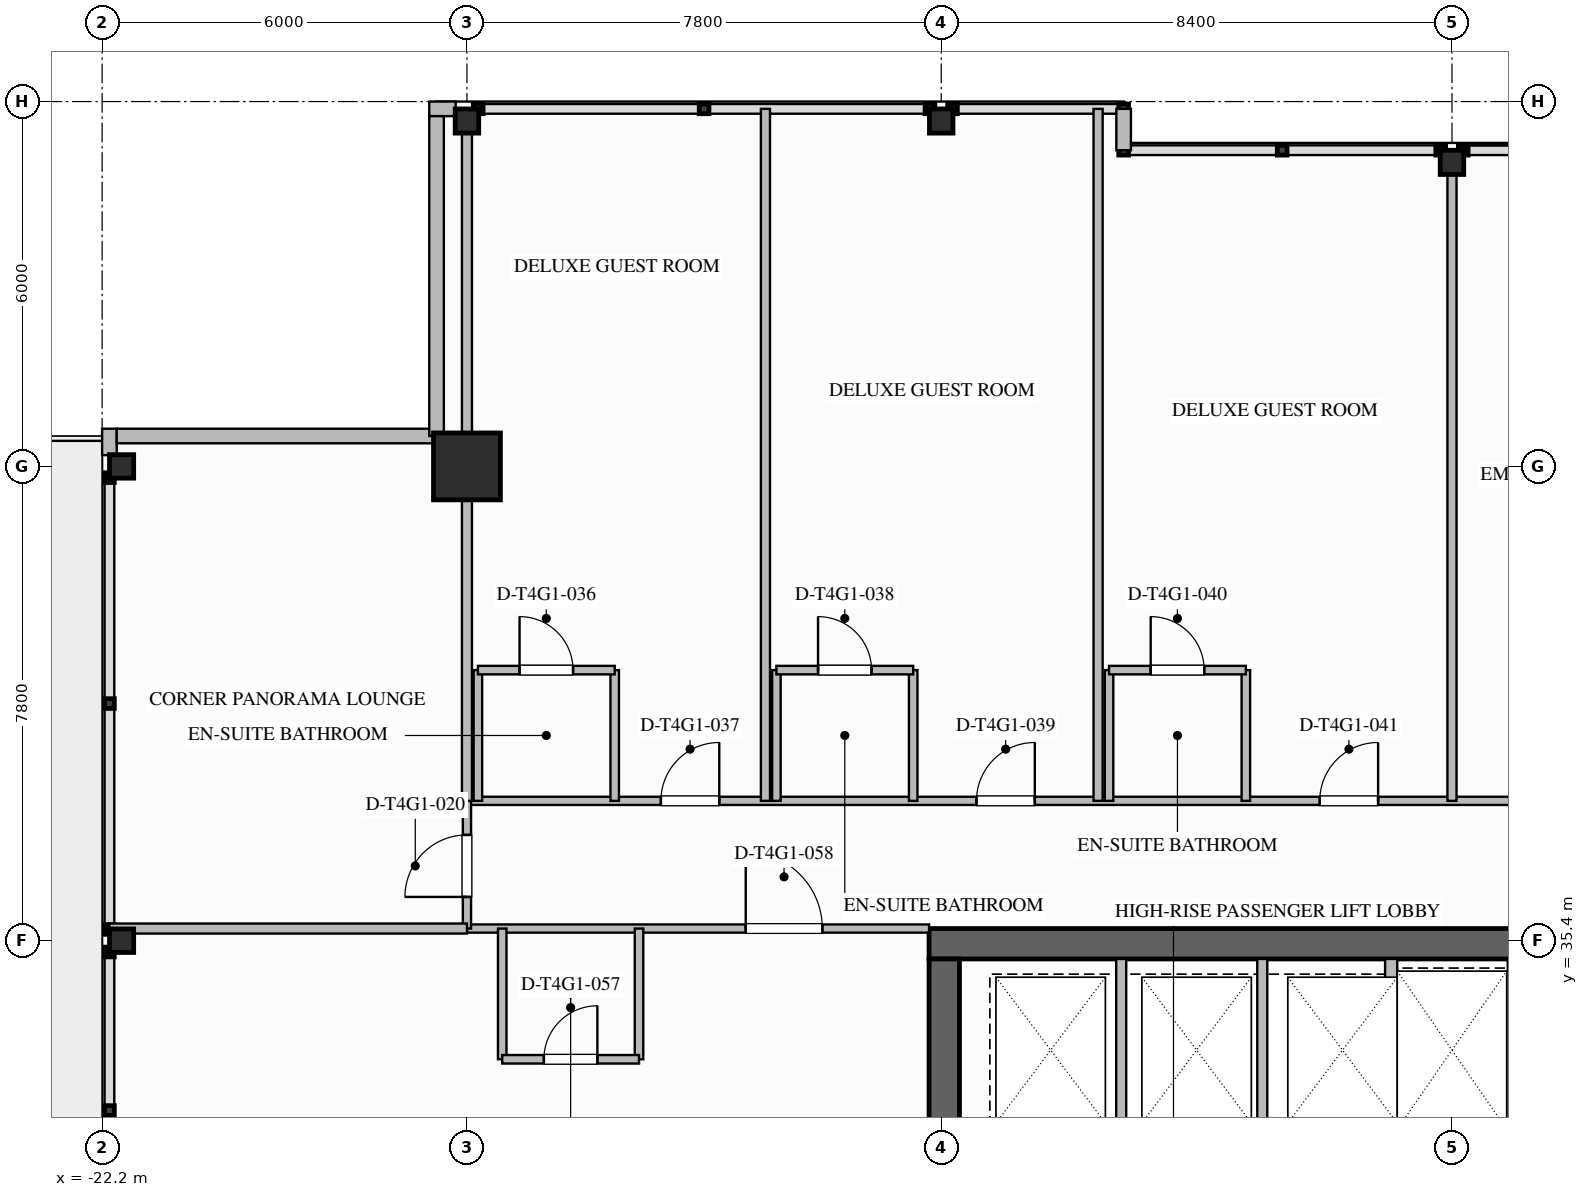
"""IFC4 building model, lengths in metres.
Left out: names, types, materials, properties, quantities, classifications, styles, units other than length and angle.
Written with IfcOpenShell. Run it as: python <this file> out.ifc"""

import sys

from ifc_helpers import new_model, si_unit, direction, frame, frame_2d, origin, origin_2d, place, context, subcontext, project, spatial, rectangle, i_section, extrude, element, fill, save


model = new_model("IFC4")
c1 = context("Model", 3, precision=1e-05, world=origin(), true_north=direction((0.0, 1.0)))
c2 = subcontext(c1, "Body", "Model", "MODEL_VIEW")
j1 = project(units=[si_unit("LENGTHUNIT", "METRE"), si_unit("PLANEANGLEUNIT", "RADIAN")], contexts=[c1])
p1 = place(None, origin())
s1 = spatial("IfcSite", under=j1, at=p1, CompositionType="ELEMENT")
p2 = place(p1, origin())
s2 = spatial("IfcBuilding", under=s1, at=p2, CompositionType="ELEMENT")
p3 = place(p2, frame((0.0, 0.0, 205.1)))
s3 = spatial("IfcBuildingStorey", under=s2, at=p3, CompositionType="ELEMENT", Elevation=205.1)
p4 = place(p3, frame((-8.6, 35.35, 0.0), z_axis=(0.0, 0.0, 1.0), x_axis=(1.0, 0.0, 0.0)))
e1 = element("IfcWall", 1, at=p4, inside=s3, PredefinedType="SHEAR", context=c2, shape_type="SweptSolid", body=[
    extrude(rectangle(XDim=17.2, YDim=0.5, at=frame_2d((8.6, 0.0))), origin(), (0.0, 0.0, 1.0), 3.6),
])
p5 = place(p3, frame((-8.35, 18.9, 0.0), z_axis=(0.0, 0.0, 1.0), x_axis=(0.0, 1.0, 0.0)))
e2 = element("IfcWall", 2, at=p5, inside=s3, PredefinedType="SHEAR", context=c2, shape_type="SweptSolid", body=[
    extrude(rectangle(XDim=16.2, YDim=0.5, at=frame_2d((8.1, 0.0))), origin(), (0.0, 0.0, 1.0), 3.6),
])
p6 = place(p3, frame((-16.2, 43.2, 0.0), z_axis=(0.0, 0.0, 1.0), x_axis=(1.0, 0.0, 0.0)))
e3 = element("IfcColumn", 3, at=p6, inside=s3, PredefinedType="COLUMN", context=c2, shape_type="SweptSolid", body=[
    extrude(rectangle(XDim=1.1, YDim=1.1, at=origin_2d()), origin(), (0.0, 0.0, 1.0), 3.6),
])
for number, where, z_axis, x_axis in (
    (4, (-21.88, 35.4, -0.26), (0.0, 0.0, 1.0), (1.0, 0.0, 0.0)),
    (5, (-21.88, 43.2, -0.26), (0.0, 0.0, 1.0), (1.0, 0.0, 0.0)),
):
    element("IfcColumn", number, at=place(p3, frame(where, z_axis=z_axis, x_axis=x_axis)), inside=s3, PredefinedType="COLUMN", context=c2, shape_type="SweptSolid", body=[
        extrude(i_section(OverallWidth=0.397, OverallDepth=0.387, WebThickness=0.021, FlangeThickness=0.033, FilletRadius=0.025, at=origin_2d()), origin(), (0.0, 0.0, 1.0), 3.857),
    ])
for number, where, z_axis, x_axis in (
    (6, (-16.2, 48.88, 0.0), (0.0, 0.0, 1.0), (0.0, 1.0, 0.0)),
    (7, (-8.4, 48.88, 0.0), (0.0, 0.0, 1.0), (0.0, 1.0, 0.0)),
    (8, (0.0, 48.2, 0.0), (0.0, 0.0, 1.0), (0.0, 1.0, 0.0)),
):
    element("IfcColumn", number, at=place(p3, frame(where, z_axis=z_axis, x_axis=x_axis)), inside=s3, PredefinedType="COLUMN", context=c2, shape_type="SweptSolid", body=[
        extrude(i_section(OverallWidth=0.397, OverallDepth=0.387, WebThickness=0.021, FlangeThickness=0.033, FilletRadius=0.025, at=origin_2d()), origin(), (0.0, 0.0, 1.0), 3.597),
    ])
for number, where, z_axis, x_axis in (
    (9, (-22.08, 43.385, 0.0), (0.0, 0.0, 1.0), (0.0, 1.0, 0.0)),
    (10, (-16.82, 49.08, 0.0), (0.0, 0.0, 1.0), (1.0, 0.0, 0.0)),
):
    element("IfcWall", number, at=place(p3, frame(where, z_axis=z_axis, x_axis=x_axis)), inside=s3, PredefinedType="STANDARD", context=c2, shape_type="SweptSolid", body=[
        extrude(rectangle(XDim=0.435, YDim=0.24, at=frame_2d((0.217, 0.0))), origin(), (0.0, 0.0, 1.0), 3.34),
    ])
for number, where, z_axis, x_axis in (
    (11, (-21.96, 43.7, 0.0), (0.0, 0.0, 1.0), (1.0, 0.0, 0.0)),
    (12, (-16.7, 43.7, 0.0), (0.0, 0.0, 1.0), (0.0, 1.0, 0.0)),
):
    element("IfcWall", number, at=place(p3, frame(where, z_axis=z_axis, x_axis=x_axis)), inside=s3, PredefinedType="STANDARD", context=c2, shape_type="SweptSolid", body=[
        extrude(rectangle(XDim=5.26, YDim=0.24, at=frame_2d((2.63, 0.0))), origin(), (0.0, 0.0, 1.0), 3.34),
    ])
p7 = place(p3, frame((-5.4, 49.08, 0.0), z_axis=(0.0, 0.0, 1.0), x_axis=(0.0, -1.0, 0.0)))
e13 = element("IfcWall", 13, at=p7, inside=s3, PredefinedType="STANDARD", context=c2, shape_type="SweptSolid", body=[
    extrude(rectangle(XDim=0.68, YDim=0.24, at=frame_2d((0.34, 0.0))), origin(), (0.0, 0.0, 1.0), 3.34),
])
p8 = place(p3, frame((-1.0, 32.18, 0.0), z_axis=(0.0, 0.0, 1.0), x_axis=(0.0, 1.0, 0.0)))
e14 = element("IfcWall", 14, at=p8, inside=s3, PredefinedType="SOLIDWALL", context=c2, shape_type="SweptSolid", body=[
    extrude(rectangle(XDim=2.92, YDim=0.2, at=frame_2d((1.46, 0.0))), origin(), (0.0, 0.0, 1.0), 3.34),
])
p9 = place(p3, frame((1.0, 32.18, 0.0), z_axis=(0.0, 0.0, 1.0), x_axis=(0.0, 1.0, 0.0)))
e15 = element("IfcWall", 15, at=p9, inside=s3, PredefinedType="PARTITIONING", context=c2, shape_type="SweptSolid", body=[
    extrude(rectangle(XDim=2.92, YDim=0.165, at=frame_2d((1.46, 0.0))), origin(), (0.0, 0.0, 1.0), 3.34),
])
for number, where, z_axis, x_axis in (
    (16, (-5.44, 32.22, 0.0), (0.0, 0.0, 1.0), (0.0, 1.0, 0.0)),
    (17, (-3.12, 32.22, 0.0), (0.0, 0.0, 1.0), (0.0, 1.0, 0.0)),
):
    element("IfcWall", number, at=place(p3, frame(where, z_axis=z_axis, x_axis=x_axis)), inside=s3, PredefinedType="PARTITIONING", context=c2, shape_type="SweptSolid", body=[
        extrude(rectangle(XDim=2.88, YDim=0.165, at=frame_2d((1.44, 0.0))), origin(), (0.0, 0.0, 1.0), 3.34),
    ])
p10 = place(p3, frame((-16.2, 37.7, 0.0), z_axis=(0.0, 0.0, 1.0), x_axis=(1.0, 0.0, 0.0)))
e18 = element("IfcWall", 18, at=p10, inside=s3, PredefinedType="PARTITIONING", context=c2, shape_type="SweptSolid", body=[
    extrude(rectangle(XDim=38.28, YDim=0.135, at=frame_2d((19.14, 0.0))), origin(), (0.0, 0.0, 1.0), 3.34),
])
p11 = place(p10, frame((35.785, 0.0, 0.0)))
e19 = element("IfcOpeningElement", 19, at=p11, cuts=e18, PredefinedType="OPENING", context=c2, shape_type="SweptSolid", body=[
    extrude(rectangle(XDim=1.26, YDim=2.2, at=frame_2d((0.63, 1.1))), frame((0.0, 0.077, 0.0), z_axis=(0.0, -1.0, 0.0), x_axis=(1.0, 0.0, 0.0)), (0.0, 0.0, 1.0), 0.155),
])
p12 = place(p10, frame((3.189, 0.0, 0.0)))
e20 = element("IfcOpeningElement", 20, at=p12, cuts=e18, PredefinedType="OPENING", context=c2, shape_type="SweptSolid", body=[
    extrude(rectangle(XDim=0.96, YDim=2.15, at=frame_2d((0.48, 1.075))), frame((0.0, 0.077, 0.0), z_axis=(0.0, -1.0, 0.0), x_axis=(1.0, 0.0, 0.0)), (0.0, 0.0, 1.0), 0.155),
])
p13 = place(p10, frame((8.379, 0.0, 0.0)))
e21 = element("IfcOpeningElement", 21, at=p13, cuts=e18, PredefinedType="OPENING", context=c2, shape_type="SweptSolid", body=[
    extrude(rectangle(XDim=0.96, YDim=2.15, at=frame_2d((0.48, 1.075))), frame((0.0, 0.077, 0.0), z_axis=(0.0, -1.0, 0.0), x_axis=(1.0, 0.0, 0.0)), (0.0, 0.0, 1.0), 0.155),
])
p14 = place(p10, frame((14.025, 0.0, 0.0)))
e22 = element("IfcOpeningElement", 22, at=p14, cuts=e18, PredefinedType="OPENING", context=c2, shape_type="SweptSolid", body=[
    extrude(rectangle(XDim=0.96, YDim=2.15, at=frame_2d((0.48, 1.075))), frame((0.0, 0.077, 0.0), z_axis=(0.0, -1.0, 0.0), x_axis=(1.0, 0.0, 0.0)), (0.0, 0.0, 1.0), 0.155),
])
p15 = place(p10, frame((18.18, 0.0, 0.0)))
e23 = element("IfcOpeningElement", 23, at=p15, cuts=e18, PredefinedType="OPENING", context=c2, shape_type="SweptSolid", body=[
    extrude(rectangle(XDim=1.02, YDim=2.15, at=frame_2d((0.51, 1.075))), frame((0.0, 0.077, 0.0), z_axis=(0.0, -1.0, 0.0), x_axis=(1.0, 0.0, 0.0)), (0.0, 0.0, 1.0), 0.155),
])
p16 = place(p10, frame((25.071, 0.0, 0.0)))
e24 = element("IfcOpeningElement", 24, at=p16, cuts=e18, PredefinedType="OPENING", context=c2, shape_type="SweptSolid", body=[
    extrude(rectangle(XDim=0.96, YDim=2.15, at=frame_2d((0.48, 1.075))), frame((0.0, 0.077, 0.0), z_axis=(0.0, -1.0, 0.0), x_axis=(1.0, 0.0, 0.0)), (0.0, 0.0, 1.0), 0.155),
])
p17 = place(p10, frame((30.68, 0.0, 0.0)))
e25 = element("IfcOpeningElement", 25, at=p17, cuts=e18, PredefinedType="OPENING", context=c2, shape_type="SweptSolid", body=[
    extrude(rectangle(XDim=0.96, YDim=2.15, at=frame_2d((0.48, 1.075))), frame((0.0, 0.077, 0.0), z_axis=(0.0, -1.0, 0.0), x_axis=(1.0, 0.0, 0.0)), (0.0, 0.0, 1.0), 0.155),
])
p18 = place(p3, frame((-16.2, 35.6, 0.0), z_axis=(0.0, 0.0, 1.0), x_axis=(1.0, 0.0, 0.0)))
e26 = element("IfcWall", 26, at=p18, inside=s3, PredefinedType="PARTITIONING", context=c2, shape_type="SweptSolid", body=[
    extrude(rectangle(XDim=7.6, YDim=0.135, at=frame_2d((3.8, 0.0))), origin(), (0.0, 0.0, 1.0), 2.717),
])
p19 = place(p18, frame((4.585, 0.0, 0.0)))
e27 = element("IfcOpeningElement", 27, at=p19, cuts=e26, PredefinedType="OPENING", context=c2, shape_type="SweptSolid", body=[
    extrude(rectangle(XDim=1.26, YDim=2.2, at=frame_2d((0.63, 1.1))), frame((0.0, 0.077, 0.0), z_axis=(0.0, -1.0, 0.0), x_axis=(1.0, 0.0, 0.0)), (0.0, 0.0, 1.0), 0.155),
])
p20 = place(p3, frame((-16.2, 35.6, 0.0), z_axis=(0.0, 0.0, 1.0), x_axis=(0.0, 1.0, 0.0)))
e28 = element("IfcWall", 28, at=p20, inside=s3, PredefinedType="PARTITIONING", context=c2, shape_type="SweptSolid", body=[
    extrude(rectangle(XDim=2.1, YDim=0.135, at=frame_2d((1.05, 0.0))), origin(), (0.0, 0.0, 1.0), 2.714),
])
p21 = place(p20, frame((0.52, 0.0, 0.0)))
e29 = element("IfcOpeningElement", 29, at=p21, cuts=e28, PredefinedType="OPENING", context=c2, shape_type="SweptSolid", body=[
    extrude(rectangle(XDim=1.02, YDim=2.15, at=frame_2d((0.51, 1.075))), frame((0.0, 0.077, 0.0), z_axis=(0.0, -1.0, 0.0), x_axis=(1.0, 0.0, 0.0)), (0.0, 0.0, 1.0), 0.155),
])
p22 = place(p3, frame((-16.2, 37.7, 0.0), z_axis=(0.0, 0.0, 1.0), x_axis=(0.0, 1.0, 0.0)))
e30 = element("IfcWall", 30, at=p22, inside=s3, PredefinedType="PARTITIONING", context=c2, shape_type="SweptSolid", body=[
    extrude(rectangle(XDim=11.38, YDim=0.165, at=frame_2d((5.69, 0.0))), origin(), (0.0, 0.0, 1.0), 2.714),
])
p23 = place(p3, frame((-22.08, 35.6, 0.0), z_axis=(0.0, 0.0, 1.0), x_axis=(1.0, 0.0, 0.0)))
e31 = element("IfcWall", 31, at=p23, inside=s3, PredefinedType="PARTITIONING", context=c2, shape_type="SweptSolid", body=[
    extrude(rectangle(XDim=5.88, YDim=0.165, at=frame_2d((2.94, 0.0))), origin(), (0.0, 0.0, 1.0), 2.714),
])
p24 = place(p3, frame((-16.02, 37.7, 0.0), z_axis=(0.0, 0.0, 1.0), x_axis=(0.0, 1.0, 0.0)))
e32 = element("IfcWall", 32, at=p24, inside=s3, PredefinedType="PLUMBINGWALL", context=c2, shape_type="SweptSolid", body=[
    extrude(rectangle(XDim=2.15, YDim=0.14, at=frame_2d((1.075, 0.0))), origin(), (0.0, 0.0, 1.0), 2.714),
])
p25 = place(p3, frame((-13.77, 37.7, 0.0), z_axis=(0.0, 0.0, 1.0), x_axis=(0.0, 1.0, 0.0)))
e33 = element("IfcWall", 33, at=p25, inside=s3, PredefinedType="PLUMBINGWALL", context=c2, shape_type="SweptSolid", body=[
    extrude(rectangle(XDim=2.15, YDim=0.14, at=frame_2d((1.075, 0.0))), origin(), (0.0, 0.0, 1.0), 3.34),
])
p26 = place(p3, frame((-16.02, 39.85, 0.0), z_axis=(0.0, 0.0, 1.0), x_axis=(1.0, 0.0, 0.0)))
e34 = element("IfcWall", 34, at=p26, inside=s3, PredefinedType="PLUMBINGWALL", context=c2, shape_type="SweptSolid", body=[
    extrude(rectangle(XDim=2.25, YDim=0.14, at=frame_2d((1.125, 0.0))), origin(), (0.0, 0.0, 1.0), 3.34),
])
p27 = place(p26, frame((0.685, 0.0, 0.0)))
e35 = element("IfcOpeningElement", 35, at=p27, cuts=e34, PredefinedType="OPENING", context=c2, shape_type="SweptSolid", body=[
    extrude(rectangle(XDim=0.88, YDim=2.1, at=frame_2d((0.44, 1.05))), frame((0.0, 0.08, 0.0), z_axis=(0.0, -1.0, 0.0), x_axis=(1.0, 0.0, 0.0)), (0.0, 0.0, 1.0), 0.16),
])
p28 = place(p3, frame((-11.291, 37.7, 0.0), z_axis=(0.0, 0.0, 1.0), x_axis=(0.0, 1.0, 0.0)))
e36 = element("IfcWall", 36, at=p28, inside=s3, PredefinedType="PARTITIONING", context=c2, shape_type="SweptSolid", body=[
    extrude(rectangle(XDim=11.38, YDim=0.15, at=frame_2d((5.69, 0.0))), origin(), (0.0, 0.0, 1.0), 3.34),
])
for number, where, z_axis, x_axis in (
    (37, (-11.111, 37.7, 0.0), (0.0, 0.0, 1.0), (0.0, 1.0, 0.0)),
    (38, (-8.861, 37.7, 0.0), (0.0, 0.0, 1.0), (0.0, 1.0, 0.0)),
):
    element("IfcWall", number, at=place(p3, frame(where, z_axis=z_axis, x_axis=x_axis)), inside=s3, PredefinedType="PLUMBINGWALL", context=c2, shape_type="SweptSolid", body=[
        extrude(rectangle(XDim=2.15, YDim=0.14, at=frame_2d((1.075, 0.0))), origin(), (0.0, 0.0, 1.0), 3.34),
    ])
p29 = place(p3, frame((-11.111, 39.85, 0.0), z_axis=(0.0, 0.0, 1.0), x_axis=(1.0, 0.0, 0.0)))
e39 = element("IfcWall", 39, at=p29, inside=s3, PredefinedType="PLUMBINGWALL", context=c2, shape_type="SweptSolid", body=[
    extrude(rectangle(XDim=2.25, YDim=0.14, at=frame_2d((1.125, 0.0))), origin(), (0.0, 0.0, 1.0), 3.34),
])
p30 = place(p29, frame((0.685, 0.0, 0.0)))
e40 = element("IfcOpeningElement", 40, at=p30, cuts=e39, PredefinedType="OPENING", context=c2, shape_type="SweptSolid", body=[
    extrude(rectangle(XDim=0.88, YDim=2.1, at=frame_2d((0.44, 1.05))), frame((0.0, 0.08, 0.0), z_axis=(0.0, -1.0, 0.0), x_axis=(1.0, 0.0, 0.0)), (0.0, 0.0, 1.0), 0.16),
])
p31 = place(p3, frame((-5.82, 37.7, 0.0), z_axis=(0.0, 0.0, 1.0), x_axis=(0.0, 1.0, 0.0)))
e41 = element("IfcWall", 41, at=p31, inside=s3, PredefinedType="PARTITIONING", context=c2, shape_type="SweptSolid", body=[
    extrude(rectangle(XDim=11.38, YDim=0.15, at=frame_2d((5.69, 0.0))), origin(), (0.0, 0.0, 1.0), 3.34),
])
for number, where, z_axis, x_axis in (
    (42, (-5.64, 37.7, 0.0), (0.0, 0.0, 1.0), (0.0, 1.0, 0.0)),
    (43, (-3.39, 37.7, 0.0), (0.0, 0.0, 1.0), (0.0, 1.0, 0.0)),
):
    element("IfcWall", number, at=place(p3, frame(where, z_axis=z_axis, x_axis=x_axis)), inside=s3, PredefinedType="PLUMBINGWALL", context=c2, shape_type="SweptSolid", body=[
        extrude(rectangle(XDim=2.15, YDim=0.14, at=frame_2d((1.075, 0.0))), origin(), (0.0, 0.0, 1.0), 3.34),
    ])
p32 = place(p3, frame((-5.64, 39.85, 0.0), z_axis=(0.0, 0.0, 1.0), x_axis=(1.0, 0.0, 0.0)))
e44 = element("IfcWall", 44, at=p32, inside=s3, PredefinedType="PLUMBINGWALL", context=c2, shape_type="SweptSolid", body=[
    extrude(rectangle(XDim=2.25, YDim=0.14, at=frame_2d((1.125, 0.0))), origin(), (0.0, 0.0, 1.0), 3.34),
])
p33 = place(p32, frame((0.685, 0.0, 0.0)))
e45 = element("IfcOpeningElement", 45, at=p33, cuts=e44, PredefinedType="OPENING", context=c2, shape_type="SweptSolid", body=[
    extrude(rectangle(XDim=0.88, YDim=2.1, at=frame_2d((0.44, 1.05))), frame((0.0, 0.08, 0.0), z_axis=(0.0, -1.0, 0.0), x_axis=(1.0, 0.0, 0.0)), (0.0, 0.0, 1.0), 0.16),
])
p34 = place(p3, frame((0.0, 37.7, 0.0), z_axis=(0.0, 0.0, 1.0), x_axis=(0.0, 1.0, 0.0)))
e46 = element("IfcWall", 46, at=p34, inside=s3, PredefinedType="PARTITIONING", context=c2, shape_type="SweptSolid", body=[
    extrude(rectangle(XDim=10.7, YDim=0.15, at=frame_2d((5.35, 0.0))), origin(), (0.0, 0.0, 1.0), 2.717),
])
for number, where, z_axis, x_axis in (
    (47, (-15.62, 35.6, 0.0), (0.0, 0.0, 1.0), (0.0, -1.0, 0.0)),
    (48, (-13.37, 35.6, 0.0), (0.0, 0.0, 1.0), (0.0, -1.0, 0.0)),
):
    element("IfcWall", number, at=place(p3, frame(where, z_axis=z_axis, x_axis=x_axis)), inside=s3, PredefinedType="PLUMBINGWALL", context=c2, shape_type="SweptSolid", body=[
        extrude(rectangle(XDim=2.15, YDim=0.14, at=frame_2d((1.075, 0.0))), origin(), (0.0, 0.0, 1.0), 3.34),
    ])
p35 = place(p3, frame((-15.62, 33.45, 0.0), z_axis=(0.0, 0.0, 1.0), x_axis=(1.0, 0.0, 0.0)))
e49 = element("IfcWall", 49, at=p35, inside=s3, PredefinedType="PLUMBINGWALL", context=c2, shape_type="SweptSolid", body=[
    extrude(rectangle(XDim=2.25, YDim=0.14, at=frame_2d((1.125, 0.0))), origin(), (0.0, 0.0, 1.0), 3.34),
])
p36 = place(p35, frame((0.685, 0.0, 0.0)))
e50 = element("IfcOpeningElement", 50, at=p36, cuts=e49, PredefinedType="OPENING", context=c2, shape_type="SweptSolid", body=[
    extrude(rectangle(XDim=0.88, YDim=2.1, at=frame_2d((0.44, 1.05))), frame((0.0, 0.08, 0.0), z_axis=(0.0, -1.0, 0.0), x_axis=(1.0, 0.0, 0.0)), (0.0, 0.0, 1.0), 0.16),
])
p37 = place(p21, origin())
e51 = element("IfcDoor", 51, at=p37, inside=s3, OperationType="SINGLE_SWING_LEFT", PredefinedType="DOOR", context=c2, shape_type="SweptSolid", body=[
    extrude(rectangle(XDim=1.02, YDim=2.15, at=frame_2d((0.51, 1.075))), frame((0.0, 0.025, 0.0), z_axis=(0.0, -1.0, 0.0), x_axis=(1.0, 0.0, 0.0)), (0.0, 0.0, 1.0), 0.05),
])
fill(e29, e51)
p38 = place(p27, origin())
e52 = element("IfcDoor", 52, at=p38, inside=s3, OperationType="SINGLE_SWING_LEFT", PredefinedType="DOOR", context=c2, shape_type="SweptSolid", body=[
    extrude(rectangle(XDim=0.88, YDim=2.1, at=frame_2d((0.44, 1.05))), frame((0.0, 0.025, 0.0), z_axis=(0.0, -1.0, 0.0), x_axis=(1.0, 0.0, 0.0)), (0.0, 0.0, 1.0), 0.05),
])
fill(e35, e52)
p39 = place(p12, origin())
e53 = element("IfcDoor", 53, at=p39, inside=s3, OperationType="SINGLE_SWING_RIGHT", PredefinedType="DOOR", context=c2, shape_type="SweptSolid", body=[
    extrude(rectangle(XDim=0.96, YDim=2.15, at=frame_2d((0.48, 1.075))), frame((0.0, 0.025, 0.0), z_axis=(0.0, -1.0, 0.0), x_axis=(1.0, 0.0, 0.0)), (0.0, 0.0, 1.0), 0.05),
])
fill(e20, e53)
p40 = place(p30, origin())
e54 = element("IfcDoor", 54, at=p40, inside=s3, OperationType="SINGLE_SWING_LEFT", PredefinedType="DOOR", context=c2, shape_type="SweptSolid", body=[
    extrude(rectangle(XDim=0.88, YDim=2.1, at=frame_2d((0.44, 1.05))), frame((0.0, 0.025, 0.0), z_axis=(0.0, -1.0, 0.0), x_axis=(1.0, 0.0, 0.0)), (0.0, 0.0, 1.0), 0.05),
])
fill(e40, e54)
p41 = place(p13, origin())
e55 = element("IfcDoor", 55, at=p41, inside=s3, OperationType="SINGLE_SWING_RIGHT", PredefinedType="DOOR", context=c2, shape_type="SweptSolid", body=[
    extrude(rectangle(XDim=0.96, YDim=2.15, at=frame_2d((0.48, 1.075))), frame((0.0, 0.025, 0.0), z_axis=(0.0, -1.0, 0.0), x_axis=(1.0, 0.0, 0.0)), (0.0, 0.0, 1.0), 0.05),
])
fill(e21, e55)
p42 = place(p33, origin())
e56 = element("IfcDoor", 56, at=p42, inside=s3, OperationType="SINGLE_SWING_LEFT", PredefinedType="DOOR", context=c2, shape_type="SweptSolid", body=[
    extrude(rectangle(XDim=0.88, YDim=2.1, at=frame_2d((0.44, 1.05))), frame((0.0, 0.025, 0.0), z_axis=(0.0, -1.0, 0.0), x_axis=(1.0, 0.0, 0.0)), (0.0, 0.0, 1.0), 0.05),
])
fill(e45, e56)
p43 = place(p14, origin())
e57 = element("IfcDoor", 57, at=p43, inside=s3, OperationType="SINGLE_SWING_RIGHT", PredefinedType="DOOR", context=c2, shape_type="SweptSolid", body=[
    extrude(rectangle(XDim=0.96, YDim=2.15, at=frame_2d((0.48, 1.075))), frame((0.0, 0.025, 0.0), z_axis=(0.0, -1.0, 0.0), x_axis=(1.0, 0.0, 0.0)), (0.0, 0.0, 1.0), 0.05),
])
fill(e22, e57)
p44 = place(p36, origin())
e58 = element("IfcDoor", 58, at=p44, inside=s3, OperationType="SINGLE_SWING_RIGHT", PredefinedType="DOOR", context=c2, shape_type="SweptSolid", body=[
    extrude(rectangle(XDim=0.88, YDim=2.1, at=frame_2d((0.44, 1.05))), frame((0.0, 0.025, 0.0), z_axis=(0.0, -1.0, 0.0), x_axis=(1.0, 0.0, 0.0)), (0.0, 0.0, 1.0), 0.05),
])
fill(e50, e58)
p45 = place(p19, origin())
e59 = element("IfcDoor", 59, at=p45, inside=s3, OperationType="SINGLE_SWING_LEFT", PredefinedType="DOOR", context=c2, shape_type="SweptSolid", body=[
    extrude(rectangle(XDim=1.26, YDim=2.2, at=frame_2d((0.63, 1.1))), frame((0.0, 0.025, 0.0), z_axis=(0.0, -1.0, 0.0), x_axis=(1.0, 0.0, 0.0)), (0.0, 0.0, 1.0), 0.05),
])
fill(e27, e59)
save(model, sys.argv[1])
